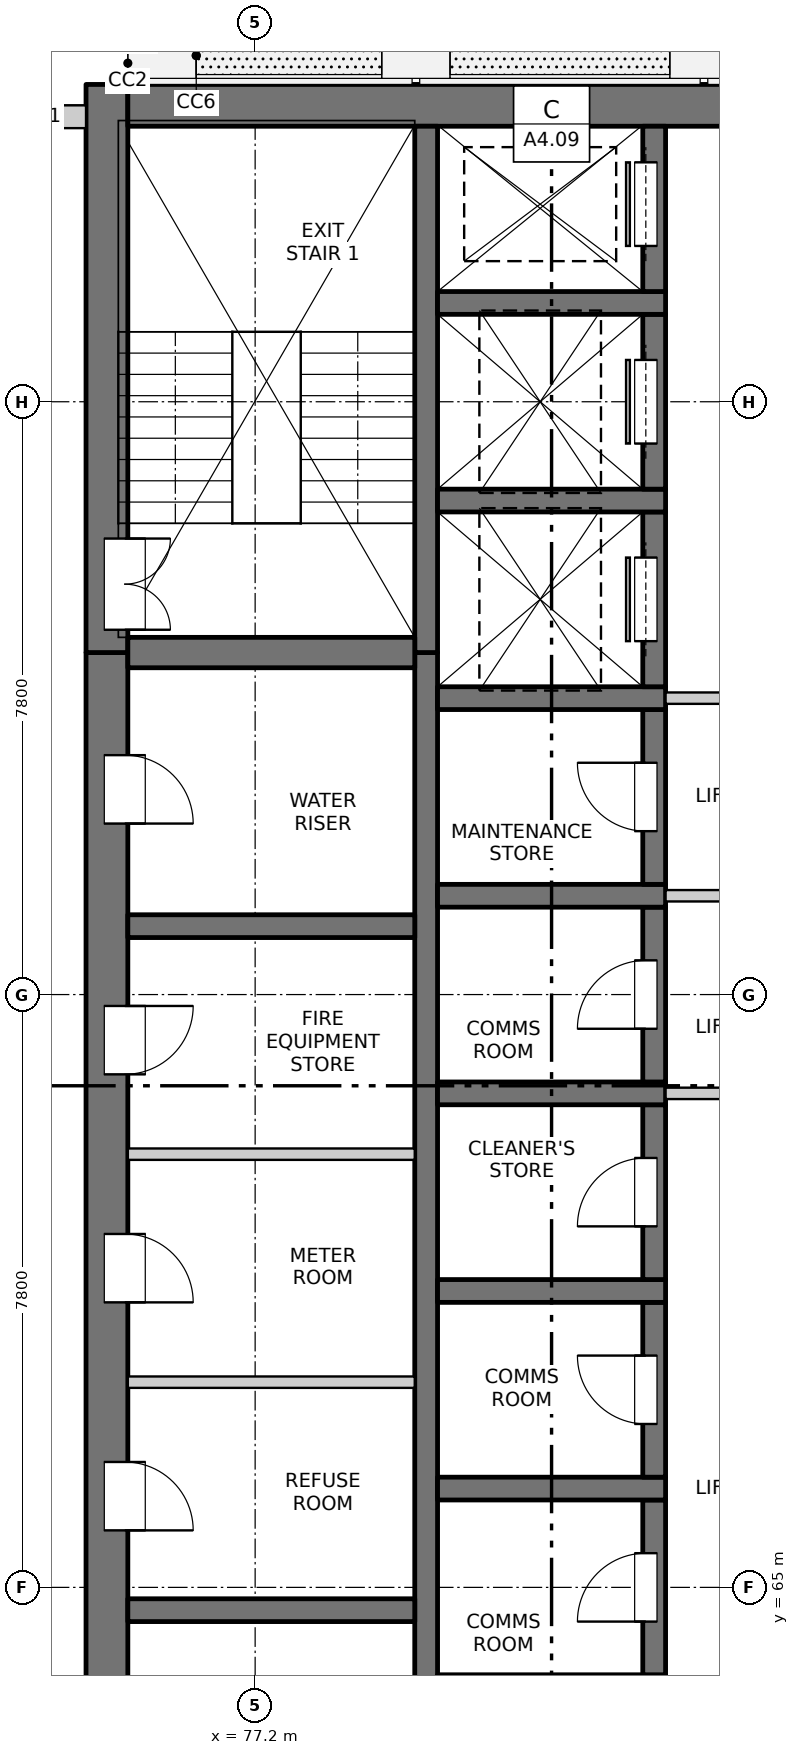
"""IFC4 building model, lengths in metres.
Left out: names, types, materials, properties, quantities, classifications, styles, units other than length and angle.
Written with IfcOpenShell. Run it as: python <this file> out.ifc"""

import sys

from ifc_helpers import new_model, si_unit, direction, frame, frame_2d, origin, place, context, subcontext, project, spatial, rectangle, extrude, element, fill, save


model = new_model("IFC4")
c1 = context("Model", 3, precision=1e-05, world=origin(), true_north=direction((0.0, 1.0)))
c2 = subcontext(c1, "Body", "Model", "MODEL_VIEW")
j1 = project(units=[si_unit("LENGTHUNIT", "METRE"), si_unit("PLANEANGLEUNIT", "RADIAN")], contexts=[c1])
p1 = place(None, origin())
s1 = spatial("IfcSite", under=j1, at=p1, CompositionType="ELEMENT")
p2 = place(p1, origin())
s2 = spatial("IfcBuilding", under=s1, at=p2, CompositionType="ELEMENT")
p3 = place(p2, frame((0.0, 0.0, 140.7)))
s3 = spatial("IfcBuildingStorey", under=s2, at=p3, CompositionType="ELEMENT", Elevation=140.7)
p4 = place(p3, frame((75.25, 54.975, -0.25), z_axis=(0.0, 0.0, 1.0), x_axis=(0.0, 1.0, 0.0)))
e1 = element("IfcWall", 1, at=p4, inside=s3, PredefinedType="SOLIDWALL", context=c2, shape_type="SweptSolid", body=[
    extrude(rectangle(XDim=22.325, YDim=0.55, at=frame_2d((11.163, 0.0))), origin(), (0.0, 0.0, 1.0), 3.35),
])
p5 = place(p4, frame((7.475, 0.0, 0.25)))
e2 = element("IfcOpeningElement", 2, at=p5, cuts=e1, PredefinedType="OPENING", context=c2, shape_type="SweptSolid", body=[
    extrude(rectangle(XDim=0.9, YDim=2.1, at=frame_2d((0.45, 1.05))), frame((0.0, 0.285, 0.0), z_axis=(0.0, -1.0, 0.0), x_axis=(1.0, 0.0, 0.0)), (0.0, 0.0, 1.0), 0.57),
])
p6 = place(p4, frame((10.775, 0.0, 0.25)))
e3 = element("IfcOpeningElement", 3, at=p6, cuts=e1, PredefinedType="OPENING", context=c2, shape_type="SweptSolid", body=[
    extrude(rectangle(XDim=0.9, YDim=2.1, at=frame_2d((0.45, 1.05))), frame((0.0, 0.285, 0.0), z_axis=(0.0, -1.0, 0.0), x_axis=(1.0, 0.0, 0.0)), (0.0, 0.0, 1.0), 0.57),
])
p7 = place(p4, frame((13.775, 0.0, 0.25)))
e4 = element("IfcOpeningElement", 4, at=p7, cuts=e1, PredefinedType="OPENING", context=c2, shape_type="SweptSolid", body=[
    extrude(rectangle(XDim=0.9, YDim=2.1, at=frame_2d((0.45, 1.05))), frame((0.0, 0.285, 0.0), z_axis=(0.0, -1.0, 0.0), x_axis=(1.0, 0.0, 0.0)), (0.0, 0.0, 1.0), 0.57),
])
p8 = place(p4, frame((16.775, 0.0, 0.25)))
e5 = element("IfcOpeningElement", 5, at=p8, cuts=e1, PredefinedType="OPENING", context=c2, shape_type="SweptSolid", body=[
    extrude(rectangle(XDim=0.9, YDim=2.1, at=frame_2d((0.45, 1.05))), frame((0.0, 0.285, 0.0), z_axis=(0.0, -1.0, 0.0), x_axis=(1.0, 0.0, 0.0)), (0.0, 0.0, 1.0), 0.57),
])
p9 = place(p4, frame((20.075, 0.0, 0.25)))
e6 = element("IfcOpeningElement", 6, at=p9, cuts=e1, PredefinedType="OPENING", context=c2, shape_type="SweptSolid", body=[
    extrude(rectangle(XDim=0.9, YDim=2.1, at=frame_2d((0.45, 1.05))), frame((0.0, 0.285, 0.0), z_axis=(0.0, -1.0, 0.0), x_axis=(1.0, 0.0, 0.0)), (0.0, 0.0, 1.0), 0.57),
])
p10 = place(p3, frame((75.25, 77.3, -0.25), z_axis=(0.0, 0.0, 1.0), x_axis=(0.0, 1.0, 0.0)))
e7 = element("IfcWall", 7, at=p10, inside=s3, PredefinedType="SOLIDWALL", context=c2, shape_type="SweptSolid", body=[
    extrude(rectangle(XDim=7.475, YDim=0.55, at=frame_2d((3.737, 0.0))), origin(), (0.0, 0.0, 1.0), 3.35),
])
p11 = place(p10, frame((0.3, 0.0, 0.25)))
e8 = element("IfcOpeningElement", 8, at=p11, cuts=e7, PredefinedType="OPENING", context=c2, shape_type="SweptSolid", body=[
    extrude(rectangle(XDim=1.2, YDim=2.1, at=frame_2d((0.6, 1.05))), frame((0.0, 0.285, 0.0), z_axis=(0.0, -1.0, 0.0), x_axis=(1.0, 0.0, 0.0)), (0.0, 0.0, 1.0), 0.57),
])
p12 = place(p3, frame((75.525, 84.5, -0.25), z_axis=(0.0, 0.0, 1.0), x_axis=(1.0, 0.0, 0.0)))
e9 = element("IfcWall", 9, at=p12, inside=s3, PredefinedType="SOLIDWALL", context=c2, shape_type="SweptSolid", body=[
    extrude(rectangle(XDim=18.95, YDim=0.55, at=frame_2d((9.475, 0.0))), origin(), (0.0, 0.0, 1.0), 3.35),
])
p13 = place(p3, frame((79.45, 60.95, -0.25), z_axis=(0.0, 0.0, 1.0), x_axis=(0.0, 1.0, 0.0)))
e10 = element("IfcWall", 10, at=p13, inside=s3, PredefinedType="SOLIDWALL", context=c2, shape_type="SweptSolid", body=[
    extrude(rectangle(XDim=16.35, YDim=0.3, at=frame_2d((8.175, 0.0))), origin(), (0.0, 0.0, 1.0), 3.35),
])
p14 = place(p3, frame((79.45, 77.3, -0.25), z_axis=(0.0, 0.0, 1.0), x_axis=(0.0, 1.0, 0.0)))
e11 = element("IfcWall", 11, at=p14, inside=s3, PredefinedType="SOLIDWALL", context=c2, shape_type="SweptSolid", body=[
    extrude(rectangle(XDim=6.925, YDim=0.3, at=frame_2d((3.462, 0.0))), origin(), (0.0, 0.0, 1.0), 3.35),
])
p15 = place(p3, frame((82.45, 63.85, -0.25), z_axis=(0.0, 0.0, 1.0), x_axis=(0.0, 1.0, 0.0)))
e12 = element("IfcWall", 12, at=p15, inside=s3, PredefinedType="SOLIDWALL", context=c2, shape_type="SweptSolid", body=[
    extrude(rectangle(XDim=2.3, YDim=0.3, at=frame_2d((1.15, 0.0))), origin(), (0.0, 0.0, 1.0), 3.35),
])
p16 = place(p15, frame((0.7, 0.0, 0.25)))
e13 = element("IfcOpeningElement", 13, at=p16, cuts=e12, PredefinedType="OPENING", context=c2, shape_type="SweptSolid", body=[
    extrude(rectangle(XDim=0.9, YDim=2.1, at=frame_2d((0.45, 1.05))), frame((0.0, 0.16, 0.0), z_axis=(0.0, -1.0, 0.0), x_axis=(1.0, 0.0, 0.0)), (0.0, 0.0, 1.0), 0.32),
])
p17 = place(p3, frame((79.6, 66.3, -0.25), z_axis=(0.0, 0.0, 1.0), x_axis=(1.0, 0.0, 0.0)))
e14 = element("IfcWall", 14, at=p17, inside=s3, PredefinedType="SOLIDWALL", context=c2, shape_type="SweptSolid", body=[
    extrude(rectangle(XDim=3.0, YDim=0.3, at=frame_2d((1.5, 0.0))), origin(), (0.0, 0.0, 1.0), 3.35),
])
p18 = place(p3, frame((82.45, 66.45, -0.25), z_axis=(0.0, 0.0, 1.0), x_axis=(0.0, 1.0, 0.0)))
e15 = element("IfcWall", 15, at=p18, inside=s3, PredefinedType="SOLIDWALL", context=c2, shape_type="SweptSolid", body=[
    extrude(rectangle(XDim=2.3, YDim=0.3, at=frame_2d((1.15, 0.0))), origin(), (0.0, 0.0, 1.0), 3.35),
])
p19 = place(p18, frame((0.7, 0.0, 0.25)))
e16 = element("IfcOpeningElement", 16, at=p19, cuts=e15, PredefinedType="OPENING", context=c2, shape_type="SweptSolid", body=[
    extrude(rectangle(XDim=0.9, YDim=2.1, at=frame_2d((0.45, 1.05))), frame((0.0, 0.16, 0.0), z_axis=(0.0, -1.0, 0.0), x_axis=(1.0, 0.0, 0.0)), (0.0, 0.0, 1.0), 0.32),
])
p20 = place(p3, frame((79.6, 68.9, -0.25), z_axis=(0.0, 0.0, 1.0), x_axis=(1.0, 0.0, 0.0)))
e17 = element("IfcWall", 17, at=p20, inside=s3, PredefinedType="SOLIDWALL", context=c2, shape_type="SweptSolid", body=[
    extrude(rectangle(XDim=3.0, YDim=0.3, at=frame_2d((1.5, 0.0))), origin(), (0.0, 0.0, 1.0), 3.35),
])
p21 = place(p3, frame((82.45, 69.05, -0.25), z_axis=(0.0, 0.0, 1.0), x_axis=(0.0, 1.0, 0.0)))
e18 = element("IfcWall", 18, at=p21, inside=s3, PredefinedType="SOLIDWALL", context=c2, shape_type="SweptSolid", body=[
    extrude(rectangle(XDim=2.3, YDim=0.3, at=frame_2d((1.15, 0.0))), origin(), (0.0, 0.0, 1.0), 3.35),
])
p22 = place(p21, frame((0.7, 0.0, 0.25)))
e19 = element("IfcOpeningElement", 19, at=p22, cuts=e18, PredefinedType="OPENING", context=c2, shape_type="SweptSolid", body=[
    extrude(rectangle(XDim=0.9, YDim=2.1, at=frame_2d((0.45, 1.05))), frame((0.0, 0.16, 0.0), z_axis=(0.0, -1.0, 0.0), x_axis=(1.0, 0.0, 0.0)), (0.0, 0.0, 1.0), 0.32),
])
p23 = place(p3, frame((79.6, 71.5, -0.25), z_axis=(0.0, 0.0, 1.0), x_axis=(1.0, 0.0, 0.0)))
e20 = element("IfcWall", 20, at=p23, inside=s3, PredefinedType="SOLIDWALL", context=c2, shape_type="SweptSolid", body=[
    extrude(rectangle(XDim=3.0, YDim=0.3, at=frame_2d((1.5, 0.0))), origin(), (0.0, 0.0, 1.0), 3.35),
])
p24 = place(p3, frame((82.45, 71.65, -0.25), z_axis=(0.0, 0.0, 1.0), x_axis=(0.0, 1.0, 0.0)))
e21 = element("IfcWall", 21, at=p24, inside=s3, PredefinedType="SOLIDWALL", context=c2, shape_type="SweptSolid", body=[
    extrude(rectangle(XDim=2.3, YDim=0.3, at=frame_2d((1.15, 0.0))), origin(), (0.0, 0.0, 1.0), 3.35),
])
p25 = place(p24, frame((0.7, 0.0, 0.25)))
e22 = element("IfcOpeningElement", 22, at=p25, cuts=e21, PredefinedType="OPENING", context=c2, shape_type="SweptSolid", body=[
    extrude(rectangle(XDim=0.9, YDim=2.1, at=frame_2d((0.45, 1.05))), frame((0.0, 0.16, 0.0), z_axis=(0.0, -1.0, 0.0), x_axis=(1.0, 0.0, 0.0)), (0.0, 0.0, 1.0), 0.32),
])
p26 = place(p3, frame((79.6, 74.1, -0.25), z_axis=(0.0, 0.0, 1.0), x_axis=(1.0, 0.0, 0.0)))
e23 = element("IfcWall", 23, at=p26, inside=s3, PredefinedType="SOLIDWALL", context=c2, shape_type="SweptSolid", body=[
    extrude(rectangle(XDim=3.0, YDim=0.3, at=frame_2d((1.5, 0.0))), origin(), (0.0, 0.0, 1.0), 3.35),
])
p27 = place(p3, frame((82.45, 74.25, -0.25), z_axis=(0.0, 0.0, 1.0), x_axis=(0.0, 1.0, 0.0)))
e24 = element("IfcWall", 24, at=p27, inside=s3, PredefinedType="SOLIDWALL", context=c2, shape_type="SweptSolid", body=[
    extrude(rectangle(XDim=2.3, YDim=0.3, at=frame_2d((1.15, 0.0))), origin(), (0.0, 0.0, 1.0), 3.35),
])
p28 = place(p27, frame((0.7, 0.0, 0.25)))
e25 = element("IfcOpeningElement", 25, at=p28, cuts=e24, PredefinedType="OPENING", context=c2, shape_type="SweptSolid", body=[
    extrude(rectangle(XDim=0.9, YDim=2.1, at=frame_2d((0.45, 1.05))), frame((0.0, 0.16, 0.0), z_axis=(0.0, -1.0, 0.0), x_axis=(1.0, 0.0, 0.0)), (0.0, 0.0, 1.0), 0.32),
])
p29 = place(p3, frame((79.6, 76.7, -0.25), z_axis=(0.0, 0.0, 1.0), x_axis=(1.0, 0.0, 0.0)))
e26 = element("IfcWall", 26, at=p29, inside=s3, PredefinedType="SOLIDWALL", context=c2, shape_type="SweptSolid", body=[
    extrude(rectangle(XDim=3.0, YDim=0.3, at=frame_2d((1.5, 0.0))), origin(), (0.0, 0.0, 1.0), 3.35),
])
p30 = place(p3, frame((82.45, 76.85, -0.25), z_axis=(0.0, 0.0, 1.0), x_axis=(0.0, 1.0, 0.0)))
e27 = element("IfcWall", 27, at=p30, inside=s3, PredefinedType="SOLIDWALL", context=c2, shape_type="SweptSolid", body=[
    extrude(rectangle(XDim=2.3, YDim=0.3, at=frame_2d((1.15, 0.0))), origin(), (0.0, 0.0, 1.0), 3.35),
])
p31 = place(p30, frame((0.6, 0.0, 0.25)))
e28 = element("IfcOpeningElement", 28, at=p31, cuts=e27, PredefinedType="OPENING", context=c2, shape_type="SweptSolid", body=[
    extrude(rectangle(XDim=1.1, YDim=2.1, at=frame_2d((0.55, 1.05))), frame((0.0, 0.16, 0.0), z_axis=(0.0, -1.0, 0.0), x_axis=(1.0, 0.0, 0.0)), (0.0, 0.0, 1.0), 0.32),
])
p32 = place(p3, frame((79.6, 79.3, -0.25), z_axis=(0.0, 0.0, 1.0), x_axis=(1.0, 0.0, 0.0)))
e29 = element("IfcWall", 29, at=p32, inside=s3, PredefinedType="SOLIDWALL", context=c2, shape_type="SweptSolid", body=[
    extrude(rectangle(XDim=3.0, YDim=0.3, at=frame_2d((1.5, 0.0))), origin(), (0.0, 0.0, 1.0), 3.35),
])
p33 = place(p3, frame((82.45, 79.45, -0.25), z_axis=(0.0, 0.0, 1.0), x_axis=(0.0, 1.0, 0.0)))
e30 = element("IfcWall", 30, at=p33, inside=s3, PredefinedType="SOLIDWALL", context=c2, shape_type="SweptSolid", body=[
    extrude(rectangle(XDim=2.3, YDim=0.3, at=frame_2d((1.15, 0.0))), origin(), (0.0, 0.0, 1.0), 3.35),
])
p34 = place(p33, frame((0.6, 0.0, 0.25)))
e31 = element("IfcOpeningElement", 31, at=p34, cuts=e30, PredefinedType="OPENING", context=c2, shape_type="SweptSolid", body=[
    extrude(rectangle(XDim=1.1, YDim=2.1, at=frame_2d((0.55, 1.05))), frame((0.0, 0.16, 0.0), z_axis=(0.0, -1.0, 0.0), x_axis=(1.0, 0.0, 0.0)), (0.0, 0.0, 1.0), 0.32),
])
p35 = place(p3, frame((79.6, 81.9, -0.25), z_axis=(0.0, 0.0, 1.0), x_axis=(1.0, 0.0, 0.0)))
e32 = element("IfcWall", 32, at=p35, inside=s3, PredefinedType="SOLIDWALL", context=c2, shape_type="SweptSolid", body=[
    extrude(rectangle(XDim=3.0, YDim=0.3, at=frame_2d((1.5, 0.0))), origin(), (0.0, 0.0, 1.0), 3.35),
])
p36 = place(p3, frame((82.45, 82.05, -0.25), z_axis=(0.0, 0.0, 1.0), x_axis=(0.0, 1.0, 0.0)))
e33 = element("IfcWall", 33, at=p36, inside=s3, PredefinedType="SOLIDWALL", context=c2, shape_type="SweptSolid", body=[
    extrude(rectangle(XDim=2.175, YDim=0.3, at=frame_2d((1.087, 0.0))), origin(), (0.0, 0.0, 1.0), 3.35),
])
p37 = place(p36, frame((0.6, 0.0, 0.25)))
e34 = element("IfcOpeningElement", 34, at=p37, cuts=e33, PredefinedType="OPENING", context=c2, shape_type="SweptSolid", body=[
    extrude(rectangle(XDim=1.1, YDim=2.1, at=frame_2d((0.55, 1.05))), frame((0.0, 0.16, 0.0), z_axis=(0.0, -1.0, 0.0), x_axis=(1.0, 0.0, 0.0)), (0.0, 0.0, 1.0), 0.32),
])
for number, where, z_axis, x_axis in (
    (35, (75.525, 64.7, -0.25), (0.0, 0.0, 1.0), (1.0, 0.0, 0.0)),
    (36, (75.525, 73.7, -0.25), (0.0, 0.0, 1.0), (1.0, 0.0, 0.0)),
):
    element("IfcWall", number, at=place(p3, frame(where, z_axis=z_axis, x_axis=x_axis)), inside=s3, PredefinedType="SOLIDWALL", context=c2, shape_type="SweptSolid", body=[
        extrude(rectangle(XDim=3.775, YDim=0.3, at=frame_2d((1.888, 0.0))), origin(), (0.0, 0.0, 1.0), 3.35),
    ])
p38 = place(p3, frame((75.525, 77.3, -0.25), z_axis=(0.0, 0.0, 1.0), x_axis=(1.0, 0.0, 0.0)))
e37 = element("IfcWall", 37, at=p38, inside=s3, PredefinedType="SOLIDWALL", context=c2, shape_type="SweptSolid", body=[
    extrude(rectangle(XDim=3.775, YDim=0.4, at=frame_2d((1.888, 0.0))), origin(), (0.0, 0.0, 1.0), 3.35),
])
p39 = place(p3, frame((73.725, 84.35, 0.0), z_axis=(0.0, 0.0, 1.0), x_axis=(1.0, 0.0, 0.0)))
e38 = element("IfcWall", 38, at=p39, inside=s3, PredefinedType="SOLIDWALL", context=c2, shape_type="SweptSolid", body=[
    extrude(rectangle(XDim=1.25, YDim=0.3, at=frame_2d((0.625, 0.0))), origin(), (0.0, 0.0, 1.0), 3.1),
])
for number, where, z_axis, x_axis in (
    (39, (75.525, 67.7, 0.0), (0.0, 0.0, 1.0), (1.0, 0.0, 0.0)),
    (40, (75.525, 70.7, 0.0), (0.0, 0.0, 1.0), (1.0, 0.0, 0.0)),
):
    element("IfcWall", number, at=place(p3, frame(where, z_axis=z_axis, x_axis=x_axis)), inside=s3, PredefinedType="PARTITIONING", context=c2, shape_type="SweptSolid", body=[
        extrude(rectangle(XDim=3.775, YDim=0.15, at=frame_2d((1.887, 0.0))), origin(), (0.0, 0.0, 1.0), 3.1),
    ])
p40 = place(p3, frame((82.6, 71.5, 0.0), z_axis=(0.0, 0.0, 1.0), x_axis=(1.0, 0.0, 0.0)))
e41 = element("IfcWall", 41, at=p40, inside=s3, PredefinedType="PARTITIONING", context=c2, shape_type="SweptSolid", body=[
    extrude(rectangle(XDim=4.8, YDim=0.15, at=frame_2d((2.4, 0.0))), origin(), (0.0, 0.0, 1.0), 3.1),
])
p41 = place(p40, frame((1.5, 0.0, 0.0)))
e42 = element("IfcOpeningElement", 42, at=p41, cuts=e41, PredefinedType="OPENING", context=c2, shape_type="SweptSolid", body=[
    extrude(rectangle(XDim=1.8, YDim=2.1, at=frame_2d((0.9, 1.05))), frame((0.0, 0.085, 0.0), z_axis=(0.0, -1.0, 0.0), x_axis=(1.0, 0.0, 0.0)), (0.0, 0.0, 1.0), 0.17),
])
p42 = place(p3, frame((82.6, 74.1, 0.0), z_axis=(0.0, 0.0, 1.0), x_axis=(1.0, 0.0, 0.0)))
e43 = element("IfcWall", 43, at=p42, inside=s3, PredefinedType="PARTITIONING", context=c2, shape_type="SweptSolid", body=[
    extrude(rectangle(XDim=4.8, YDim=0.15, at=frame_2d((2.4, 0.0))), origin(), (0.0, 0.0, 1.0), 3.1),
])
p43 = place(p42, frame((1.5, 0.0, 0.0)))
e44 = element("IfcOpeningElement", 44, at=p43, cuts=e43, PredefinedType="OPENING", context=c2, shape_type="SweptSolid", body=[
    extrude(rectangle(XDim=1.8, YDim=2.1, at=frame_2d((0.9, 1.05))), frame((0.0, 0.085, 0.0), z_axis=(0.0, -1.0, 0.0), x_axis=(1.0, 0.0, 0.0)), (0.0, 0.0, 1.0), 0.17),
])
p44 = place(p3, frame((82.6, 76.7, 0.0), z_axis=(0.0, 0.0, 1.0), x_axis=(1.0, 0.0, 0.0)))
e45 = element("IfcWall", 45, at=p44, inside=s3, PredefinedType="PARTITIONING", context=c2, shape_type="SweptSolid", body=[
    extrude(rectangle(XDim=4.8, YDim=0.15, at=frame_2d((2.4, 0.0))), origin(), (0.0, 0.0, 1.0), 3.1),
])
p45 = place(p44, frame((1.5, 0.0, 0.0)))
e46 = element("IfcOpeningElement", 46, at=p45, cuts=e45, PredefinedType="OPENING", context=c2, shape_type="SweptSolid", body=[
    extrude(rectangle(XDim=1.8, YDim=2.1, at=frame_2d((0.9, 1.05))), frame((0.0, 0.085, 0.0), z_axis=(0.0, -1.0, 0.0), x_axis=(1.0, 0.0, 0.0)), (0.0, 0.0, 1.0), 0.17),
])
p46 = place(p16, origin())
e47 = element("IfcDoor", 47, at=p46, inside=s3, OperationType="SINGLE_SWING_LEFT", PredefinedType="DOOR", context=c2, shape_type="SweptSolid", body=[
    extrude(rectangle(XDim=0.9, YDim=2.1, at=frame_2d((0.45, 1.05))), frame((0.0, 0.135, 0.0), z_axis=(0.0, -1.0, 0.0), x_axis=(1.0, 0.0, 0.0)), (0.0, 0.0, 1.0), 0.05),
])
fill(e13, e47)
p47 = place(p6, origin())
e48 = element("IfcDoor", 48, at=p47, inside=s3, OperationType="SINGLE_SWING_RIGHT", PredefinedType="DOOR", context=c2, shape_type="SweptSolid", body=[
    extrude(rectangle(XDim=0.9, YDim=2.1, at=frame_2d((0.45, 1.05))), frame((0.0, -0.21, 0.0), z_axis=(0.0, -1.0, 0.0), x_axis=(1.0, 0.0, 0.0)), (0.0, 0.0, 1.0), 0.05),
])
fill(e3, e48)
p48 = place(p19, origin())
e49 = element("IfcDoor", 49, at=p48, inside=s3, OperationType="SINGLE_SWING_RIGHT", PredefinedType="DOOR", context=c2, shape_type="SweptSolid", body=[
    extrude(rectangle(XDim=0.9, YDim=2.1, at=frame_2d((0.45, 1.05))), frame((0.0, 0.135, 0.0), z_axis=(0.0, -1.0, 0.0), x_axis=(1.0, 0.0, 0.0)), (0.0, 0.0, 1.0), 0.05),
])
fill(e16, e49)
p49 = place(p7, origin())
e50 = element("IfcDoor", 50, at=p49, inside=s3, OperationType="SINGLE_SWING_RIGHT", PredefinedType="DOOR", context=c2, shape_type="SweptSolid", body=[
    extrude(rectangle(XDim=0.9, YDim=2.1, at=frame_2d((0.45, 1.05))), frame((0.0, -0.21, 0.0), z_axis=(0.0, -1.0, 0.0), x_axis=(1.0, 0.0, 0.0)), (0.0, 0.0, 1.0), 0.05),
])
fill(e4, e50)
p50 = place(p22, origin())
e51 = element("IfcDoor", 51, at=p50, inside=s3, OperationType="SINGLE_SWING_LEFT", PredefinedType="DOOR", context=c2, shape_type="SweptSolid", body=[
    extrude(rectangle(XDim=0.9, YDim=2.1, at=frame_2d((0.45, 1.05))), frame((0.0, 0.135, 0.0), z_axis=(0.0, -1.0, 0.0), x_axis=(1.0, 0.0, 0.0)), (0.0, 0.0, 1.0), 0.05),
])
fill(e19, e51)
p51 = place(p8, origin())
e52 = element("IfcDoor", 52, at=p51, inside=s3, OperationType="SINGLE_SWING_LEFT", PredefinedType="DOOR", context=c2, shape_type="SweptSolid", body=[
    extrude(rectangle(XDim=0.9, YDim=2.1, at=frame_2d((0.45, 1.05))), frame((0.0, -0.21, 0.0), z_axis=(0.0, -1.0, 0.0), x_axis=(1.0, 0.0, 0.0)), (0.0, 0.0, 1.0), 0.05),
])
fill(e5, e52)
p52 = place(p25, origin())
e53 = element("IfcDoor", 53, at=p52, inside=s3, OperationType="SINGLE_SWING_LEFT", PredefinedType="DOOR", context=c2, shape_type="SweptSolid", body=[
    extrude(rectangle(XDim=0.9, YDim=2.1, at=frame_2d((0.45, 1.05))), frame((0.0, 0.135, 0.0), z_axis=(0.0, -1.0, 0.0), x_axis=(1.0, 0.0, 0.0)), (0.0, 0.0, 1.0), 0.05),
])
fill(e22, e53)
p53 = place(p28, origin())
e54 = element("IfcDoor", 54, at=p53, inside=s3, OperationType="SINGLE_SWING_RIGHT", PredefinedType="DOOR", context=c2, shape_type="SweptSolid", body=[
    extrude(rectangle(XDim=0.9, YDim=2.1, at=frame_2d((0.45, 1.05))), frame((0.0, 0.135, 0.0), z_axis=(0.0, -1.0, 0.0), x_axis=(1.0, 0.0, 0.0)), (0.0, 0.0, 1.0), 0.05),
])
fill(e25, e54)
p54 = place(p9, origin())
e55 = element("IfcDoor", 55, at=p54, inside=s3, OperationType="SINGLE_SWING_RIGHT", PredefinedType="DOOR", context=c2, shape_type="SweptSolid", body=[
    extrude(rectangle(XDim=0.9, YDim=2.1, at=frame_2d((0.45, 1.05))), frame((0.0, -0.21, 0.0), z_axis=(0.0, -1.0, 0.0), x_axis=(1.0, 0.0, 0.0)), (0.0, 0.0, 1.0), 0.05),
])
fill(e6, e55)
p55 = place(p31, origin())
e56 = element("IfcDoor", 56, at=p55, inside=s3, OperationType="SLIDING_TO_LEFT", PredefinedType="DOOR", context=c2, shape_type="SweptSolid", body=[
    extrude(rectangle(XDim=1.1, YDim=2.1, at=frame_2d((0.55, 1.05))), frame((0.0, 0.135, 0.0), z_axis=(0.0, -1.0, 0.0), x_axis=(1.0, 0.0, 0.0)), (0.0, 0.0, 1.0), 0.05),
])
fill(e28, e56)
p56 = place(p11, origin())
e57 = element("IfcDoor", 57, at=p56, inside=s3, OperationType="DOUBLE_DOOR_SINGLE_SWING", PredefinedType="DOOR", context=c2, shape_type="SweptSolid", body=[
    extrude(rectangle(XDim=1.2, YDim=2.1, at=frame_2d((0.6, 1.05))), frame((0.0, -0.21, 0.0), z_axis=(0.0, -1.0, 0.0), x_axis=(1.0, 0.0, 0.0)), (0.0, 0.0, 1.0), 0.05),
])
fill(e8, e57)
p57 = place(p34, origin())
e58 = element("IfcDoor", 58, at=p57, inside=s3, OperationType="SLIDING_TO_LEFT", PredefinedType="DOOR", context=c2, shape_type="SweptSolid", body=[
    extrude(rectangle(XDim=1.1, YDim=2.1, at=frame_2d((0.55, 1.05))), frame((0.0, 0.135, 0.0), z_axis=(0.0, -1.0, 0.0), x_axis=(1.0, 0.0, 0.0)), (0.0, 0.0, 1.0), 0.05),
])
fill(e31, e58)
p58 = place(p37, origin())
e59 = element("IfcDoor", 59, at=p58, inside=s3, OperationType="SLIDING_TO_RIGHT", PredefinedType="DOOR", context=c2, shape_type="SweptSolid", body=[
    extrude(rectangle(XDim=1.1, YDim=2.1, at=frame_2d((0.55, 1.05))), frame((0.0, 0.135, 0.0), z_axis=(0.0, -1.0, 0.0), x_axis=(1.0, 0.0, 0.0)), (0.0, 0.0, 1.0), 0.05),
])
fill(e34, e59)
save(model, sys.argv[1])
